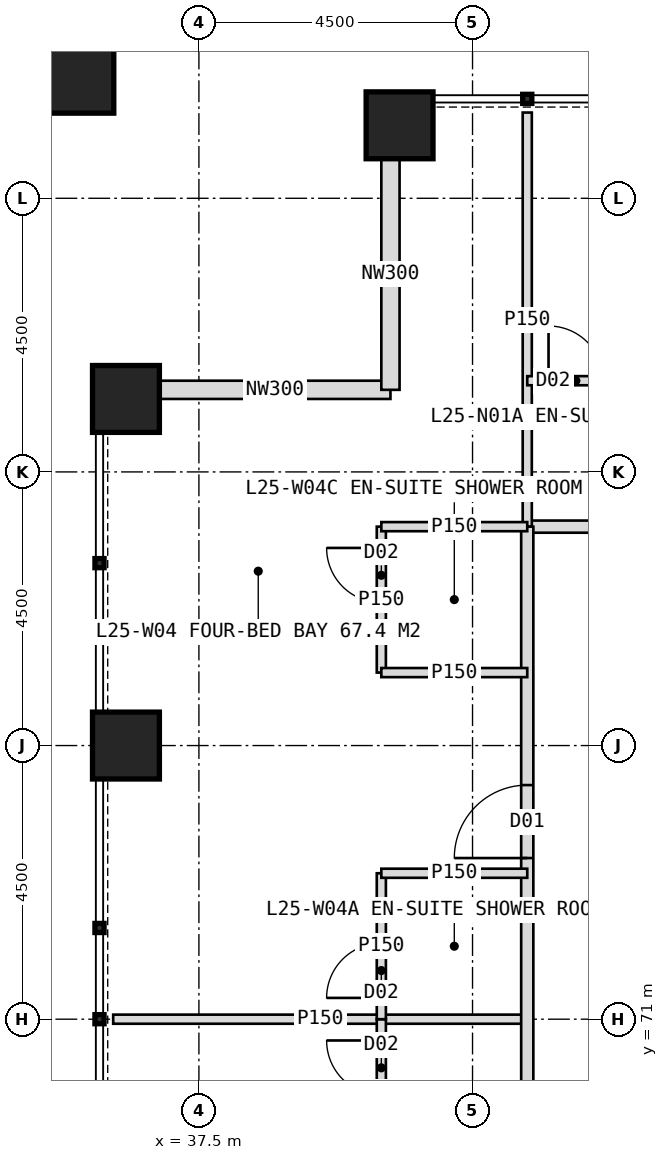
"""IFC4 building model, lengths in metres.
Left out: names, types, materials, properties, quantities, classifications, styles, units other than length and angle.
Written with IfcOpenShell. Run it as: python <this file> out.ifc"""

import sys

from ifc_helpers import new_model, si_unit, direction, frame, frame_2d, origin, origin_2d, place, context, subcontext, project, spatial, rectangle, hollow_rectangle, extrude, element, fill, save


model = new_model("IFC4")
c1 = context("Model", 3, precision=1e-05, world=origin(), true_north=direction((0.0, 1.0)))
c2 = subcontext(c1, "Body", "Model", "MODEL_VIEW")
j1 = project(units=[si_unit("LENGTHUNIT", "METRE"), si_unit("PLANEANGLEUNIT", "RADIAN")], contexts=[c1])
p1 = place(None, origin())
s1 = spatial("IfcSite", under=j1, at=p1, CompositionType="ELEMENT")
p2 = place(p1, origin())
s2 = spatial("IfcBuilding", under=s1, at=p2, CompositionType="ELEMENT")
p3 = place(p2, frame((0.0, 0.0, 108.0)))
s3 = spatial("IfcBuildingStorey", under=s2, at=p3, CompositionType="ELEMENT", Elevation=108.0)
for number, where, z_axis, x_axis in (
    (1, (40.8, 85.7, 0.0), (0.0, 0.0, 1.0), (1.0, 0.0, 0.0)),
    (2, (36.3, 75.5, 0.0), (0.0, 0.0, 1.0), (1.0, 0.0, 0.0)),
    (3, (36.3, 81.2, 0.0), (0.0, 0.0, 1.0), (1.0, 0.0, 0.0)),
):
    element("IfcColumn", number, at=place(p3, frame(where, z_axis=z_axis, x_axis=x_axis)), inside=s3, PredefinedType="COLUMN", context=c2, shape_type="SweptSolid", body=[
        extrude(hollow_rectangle(XDim=1.1, YDim=1.1, WallThickness=0.1, at=origin_2d()), origin(), (0.0, 0.0, 1.0), 4.0),
    ])
p4 = place(p3, frame((35.4, 86.6, 0.0), z_axis=(0.0, 0.0, 1.0), x_axis=(1.0, 0.0, 0.0)))
e4 = element("IfcColumn", 4, at=p4, inside=s3, PredefinedType="COLUMN", context=c2, shape_type="SweptSolid", body=[
    extrude(hollow_rectangle(XDim=1.4, YDim=1.4, WallThickness=0.08, at=origin_2d()), origin(), (0.0, 0.0, 1.0), 4.0),
])
for number, where, z_axis, x_axis in (
    (5, (36.85, 81.35, 0.0), (0.0, 0.0, 1.0), (1.0, 0.0, 0.0)),
    (6, (40.65, 81.35, 0.0), (0.0, 0.0, 1.0), (0.0, 1.0, 0.0)),
):
    element("IfcWall", number, at=place(p3, frame(where, z_axis=z_axis, x_axis=x_axis)), inside=s3, PredefinedType="ELEMENTEDWALL", context=c2, shape_type="SweptSolid", body=[
        extrude(rectangle(XDim=3.8, YDim=0.3, at=frame_2d((1.9, 0.0))), origin(), (0.0, 0.0, 1.0), 4.0),
    ])
p5 = place(p3, frame((42.9, 79.1, 0.0), z_axis=(0.0, 0.0, 1.0), x_axis=(1.0, 0.0, 0.0)))
e7 = element("IfcWall", 7, at=p5, inside=s3, PredefinedType="PARTITIONING", context=c2, shape_type="SweptSolid", body=[
    extrude(rectangle(XDim=34.2, YDim=0.2, at=frame_2d((17.1, 0.0))), origin(), (0.0, 0.0, 1.0), 3.75),
])
p6 = place(p5, frame((3.25, 0.0, 0.0)))
e8 = element("IfcOpeningElement", 8, at=p6, cuts=e7, PredefinedType="OPENING", context=c2, shape_type="SweptSolid", body=[
    extrude(rectangle(XDim=1.2, YDim=2.2, at=frame_2d((0.6, 1.1))), frame((0.0, 0.11, 0.0), z_axis=(0.0, -1.0, 0.0), x_axis=(1.0, 0.0, 0.0)), (0.0, 0.0, 1.0), 0.22),
])
p7 = place(p5, frame((9.25, 0.0, 0.0)))
e9 = element("IfcOpeningElement", 9, at=p7, cuts=e7, PredefinedType="OPENING", context=c2, shape_type="SweptSolid", body=[
    extrude(rectangle(XDim=1.2, YDim=2.2, at=frame_2d((0.6, 1.1))), frame((0.0, 0.11, 0.0), z_axis=(0.0, -1.0, 0.0), x_axis=(1.0, 0.0, 0.0)), (0.0, 0.0, 1.0), 0.22),
])
p8 = place(p5, frame((13.75, 0.0, 0.0)))
e10 = element("IfcOpeningElement", 10, at=p8, cuts=e7, PredefinedType="OPENING", context=c2, shape_type="SweptSolid", body=[
    extrude(rectangle(XDim=1.2, YDim=2.2, at=frame_2d((0.6, 1.1))), frame((0.0, 0.11, 0.0), z_axis=(0.0, -1.0, 0.0), x_axis=(1.0, 0.0, 0.0)), (0.0, 0.0, 1.0), 0.22),
])
p9 = place(p5, frame((19.6, 0.0, 0.0)))
e11 = element("IfcOpeningElement", 11, at=p9, cuts=e7, PredefinedType="OPENING", context=c2, shape_type="SweptSolid", body=[
    extrude(rectangle(XDim=1.0, YDim=2.1, at=frame_2d((0.5, 1.05))), frame((0.0, 0.11, 0.0), z_axis=(0.0, -1.0, 0.0), x_axis=(1.0, 0.0, 0.0)), (0.0, 0.0, 1.0), 0.22),
])
p10 = place(p5, frame((27.25, 0.0, 0.0)))
e12 = element("IfcOpeningElement", 12, at=p10, cuts=e7, PredefinedType="OPENING", context=c2, shape_type="SweptSolid", body=[
    extrude(rectangle(XDim=1.2, YDim=2.2, at=frame_2d((0.6, 1.1))), frame((0.0, 0.11, 0.0), z_axis=(0.0, -1.0, 0.0), x_axis=(1.0, 0.0, 0.0)), (0.0, 0.0, 1.0), 0.22),
])
p11 = place(p3, frame((42.9, 79.1, 0.0), z_axis=(0.0, 0.0, 1.0), x_axis=(0.0, 1.0, 0.0)))
e13 = element("IfcWall", 13, at=p11, inside=s3, PredefinedType="PARTITIONING", context=c2, shape_type="SweptSolid", body=[
    extrude(rectangle(XDim=6.81, YDim=0.15, at=frame_2d((3.405, 0.0))), origin(), (0.0, 0.0, 1.0), 3.75),
])
p12 = place(p3, frame((42.9, 81.5, 0.0), z_axis=(0.0, 0.0, 1.0), x_axis=(1.0, 0.0, 0.0)))
e14 = element("IfcWall", 14, at=p12, inside=s3, PredefinedType="PARTITIONING", context=c2, shape_type="SweptSolid", body=[
    extrude(rectangle(XDim=3.0, YDim=0.15, at=frame_2d((1.5, 0.0))), origin(), (0.0, 0.0, 1.0), 3.75),
])
p13 = place(p12, frame((0.35, 0.0, 0.0)))
e15 = element("IfcOpeningElement", 15, at=p13, cuts=e14, PredefinedType="OPENING", context=c2, shape_type="SweptSolid", body=[
    extrude(rectangle(XDim=0.9, YDim=2.1, at=frame_2d((0.45, 1.05))), frame((0.0, 0.085, 0.0), z_axis=(0.0, -1.0, 0.0), x_axis=(1.0, 0.0, 0.0)), (0.0, 0.0, 1.0), 0.17),
])
p14 = place(p3, frame((42.9, 71.0, 0.0), z_axis=(0.0, 0.0, 1.0), x_axis=(-1.0, 0.0, 0.0)))
e16 = element("IfcWall", 16, at=p14, inside=s3, PredefinedType="PARTITIONING", context=c2, shape_type="SweptSolid", body=[
    extrude(rectangle(XDim=6.81, YDim=0.15, at=frame_2d((3.405, 0.0))), origin(), (0.0, 0.0, 1.0), 3.75),
])
p15 = place(p3, frame((42.9, 44.9, 0.0), z_axis=(0.0, 0.0, 1.0), x_axis=(0.0, 1.0, 0.0)))
e17 = element("IfcWall", 17, at=p15, inside=s3, PredefinedType="PARTITIONING", context=c2, shape_type="SweptSolid", body=[
    extrude(rectangle(XDim=34.2, YDim=0.2, at=frame_2d((17.1, 0.0))), origin(), (0.0, 0.0, 1.0), 3.75),
])
p16 = place(p15, frame((3.25, 0.0, 0.0)))
e18 = element("IfcOpeningElement", 18, at=p16, cuts=e17, PredefinedType="OPENING", context=c2, shape_type="SweptSolid", body=[
    extrude(rectangle(XDim=1.2, YDim=2.2, at=frame_2d((0.6, 1.1))), frame((0.0, 0.11, 0.0), z_axis=(0.0, -1.0, 0.0), x_axis=(1.0, 0.0, 0.0)), (0.0, 0.0, 1.0), 0.22),
])
p17 = place(p15, frame((10.75, 0.0, 0.0)))
e19 = element("IfcOpeningElement", 19, at=p17, cuts=e17, PredefinedType="OPENING", context=c2, shape_type="SweptSolid", body=[
    extrude(rectangle(XDim=1.2, YDim=2.2, at=frame_2d((0.6, 1.1))), frame((0.0, 0.11, 0.0), z_axis=(0.0, -1.0, 0.0), x_axis=(1.0, 0.0, 0.0)), (0.0, 0.0, 1.0), 0.22),
])
p18 = place(p15, frame((19.75, 0.0, 0.0)))
e20 = element("IfcOpeningElement", 20, at=p18, cuts=e17, PredefinedType="OPENING", context=c2, shape_type="SweptSolid", body=[
    extrude(rectangle(XDim=1.2, YDim=2.2, at=frame_2d((0.6, 1.1))), frame((0.0, 0.11, 0.0), z_axis=(0.0, -1.0, 0.0), x_axis=(1.0, 0.0, 0.0)), (0.0, 0.0, 1.0), 0.22),
])
p19 = place(p15, frame((28.75, 0.0, 0.0)))
e21 = element("IfcOpeningElement", 21, at=p19, cuts=e17, PredefinedType="OPENING", context=c2, shape_type="SweptSolid", body=[
    extrude(rectangle(XDim=1.2, YDim=2.2, at=frame_2d((0.6, 1.1))), frame((0.0, 0.11, 0.0), z_axis=(0.0, -1.0, 0.0), x_axis=(1.0, 0.0, 0.0)), (0.0, 0.0, 1.0), 0.22),
])
p20 = place(p3, frame((40.5, 68.6, 0.0), z_axis=(0.0, 0.0, 1.0), x_axis=(0.0, 1.0, 0.0)))
e22 = element("IfcWall", 22, at=p20, inside=s3, PredefinedType="PARTITIONING", context=c2, shape_type="SweptSolid", body=[
    extrude(rectangle(XDim=2.4, YDim=0.15, at=frame_2d((1.2, 0.0))), origin(), (0.0, 0.0, 1.0), 3.75),
])
p21 = place(p20, frame((1.15, 0.0, 0.0)))
e23 = element("IfcOpeningElement", 23, at=p21, cuts=e22, PredefinedType="OPENING", context=c2, shape_type="SweptSolid", body=[
    extrude(rectangle(XDim=0.9, YDim=2.1, at=frame_2d((0.45, 1.05))), frame((0.0, 0.085, 0.0), z_axis=(0.0, -1.0, 0.0), x_axis=(1.0, 0.0, 0.0)), (0.0, 0.0, 1.0), 0.17),
])
p22 = place(p3, frame((40.5, 71.0, 0.0), z_axis=(0.0, 0.0, 1.0), x_axis=(0.0, 1.0, 0.0)))
e24 = element("IfcWall", 24, at=p22, inside=s3, PredefinedType="PARTITIONING", context=c2, shape_type="SweptSolid", body=[
    extrude(rectangle(XDim=2.4, YDim=0.15, at=frame_2d((1.2, 0.0))), origin(), (0.0, 0.0, 1.0), 3.75),
])
p23 = place(p22, frame((0.35, 0.0, 0.0)))
e25 = element("IfcOpeningElement", 25, at=p23, cuts=e24, PredefinedType="OPENING", context=c2, shape_type="SweptSolid", body=[
    extrude(rectangle(XDim=0.9, YDim=2.1, at=frame_2d((0.45, 1.05))), frame((0.0, 0.085, 0.0), z_axis=(0.0, -1.0, 0.0), x_axis=(1.0, 0.0, 0.0)), (0.0, 0.0, 1.0), 0.17),
])
p24 = place(p3, frame((42.9, 73.4, 0.0), z_axis=(0.0, 0.0, 1.0), x_axis=(-1.0, 0.0, 0.0)))
e26 = element("IfcWall", 26, at=p24, inside=s3, PredefinedType="PARTITIONING", context=c2, shape_type="SweptSolid", body=[
    extrude(rectangle(XDim=2.4, YDim=0.15, at=frame_2d((1.2, 0.0))), origin(), (0.0, 0.0, 1.0), 3.75),
])
p25 = place(p3, frame((40.5, 76.7, 0.0), z_axis=(0.0, 0.0, 1.0), x_axis=(0.0, 1.0, 0.0)))
e27 = element("IfcWall", 27, at=p25, inside=s3, PredefinedType="PARTITIONING", context=c2, shape_type="SweptSolid", body=[
    extrude(rectangle(XDim=2.4, YDim=0.15, at=frame_2d((1.2, 0.0))), origin(), (0.0, 0.0, 1.0), 3.75),
])
p26 = place(p25, frame((1.15, 0.0, 0.0)))
e28 = element("IfcOpeningElement", 28, at=p26, cuts=e27, PredefinedType="OPENING", context=c2, shape_type="SweptSolid", body=[
    extrude(rectangle(XDim=0.9, YDim=2.1, at=frame_2d((0.45, 1.05))), frame((0.0, 0.085, 0.0), z_axis=(0.0, -1.0, 0.0), x_axis=(1.0, 0.0, 0.0)), (0.0, 0.0, 1.0), 0.17),
])
for number, where, z_axis, x_axis in (
    (29, (42.9, 76.7, 0.0), (0.0, 0.0, 1.0), (-1.0, 0.0, 0.0)),
    (30, (42.9, 79.1, 0.0), (0.0, 0.0, 1.0), (-1.0, 0.0, 0.0)),
):
    element("IfcWall", number, at=place(p3, frame(where, z_axis=z_axis, x_axis=x_axis)), inside=s3, PredefinedType="PARTITIONING", context=c2, shape_type="SweptSolid", body=[
        extrude(rectangle(XDim=2.4, YDim=0.15, at=frame_2d((1.2, 0.0))), origin(), (0.0, 0.0, 1.0), 3.75),
    ])
p27 = place(p13, origin())
e31 = element("IfcDoor", 31, at=p27, inside=s3, OperationType="SINGLE_SWING_LEFT", PredefinedType="DOOR", context=c2, shape_type="SweptSolid", body=[
    extrude(rectangle(XDim=0.9, YDim=2.1, at=frame_2d((0.45, 1.05))), frame((0.0, 0.025, 0.0), z_axis=(0.0, -1.0, 0.0), x_axis=(1.0, 0.0, 0.0)), (0.0, 0.0, 1.0), 0.05),
])
fill(e15, e31)
p28 = place(p21, origin())
e32 = element("IfcDoor", 32, at=p28, inside=s3, OperationType="SINGLE_SWING_RIGHT", PredefinedType="DOOR", context=c2, shape_type="SweptSolid", body=[
    extrude(rectangle(XDim=0.9, YDim=2.1, at=frame_2d((0.45, 1.05))), frame((0.0, 0.025, 0.0), z_axis=(0.0, -1.0, 0.0), x_axis=(1.0, 0.0, 0.0)), (0.0, 0.0, 1.0), 0.05),
])
fill(e23, e32)
p29 = place(p19, origin())
e33 = element("IfcDoor", 33, at=p29, inside=s3, OperationType="SINGLE_SWING_LEFT", PredefinedType="DOOR", context=c2, shape_type="SweptSolid", body=[
    extrude(rectangle(XDim=1.2, YDim=2.2, at=frame_2d((0.6, 1.1))), frame((0.0, 0.025, 0.0), z_axis=(0.0, -1.0, 0.0), x_axis=(1.0, 0.0, 0.0)), (0.0, 0.0, 1.0), 0.05),
])
fill(e21, e33)
p30 = place(p23, origin())
e34 = element("IfcDoor", 34, at=p30, inside=s3, OperationType="SINGLE_SWING_LEFT", PredefinedType="DOOR", context=c2, shape_type="SweptSolid", body=[
    extrude(rectangle(XDim=0.9, YDim=2.1, at=frame_2d((0.45, 1.05))), frame((0.0, 0.025, 0.0), z_axis=(0.0, -1.0, 0.0), x_axis=(1.0, 0.0, 0.0)), (0.0, 0.0, 1.0), 0.05),
])
fill(e25, e34)
p31 = place(p26, origin())
e35 = element("IfcDoor", 35, at=p31, inside=s3, OperationType="SINGLE_SWING_RIGHT", PredefinedType="DOOR", context=c2, shape_type="SweptSolid", body=[
    extrude(rectangle(XDim=0.9, YDim=2.1, at=frame_2d((0.45, 1.05))), frame((0.0, 0.025, 0.0), z_axis=(0.0, -1.0, 0.0), x_axis=(1.0, 0.0, 0.0)), (0.0, 0.0, 1.0), 0.05),
])
fill(e28, e35)
save(model, sys.argv[1])
